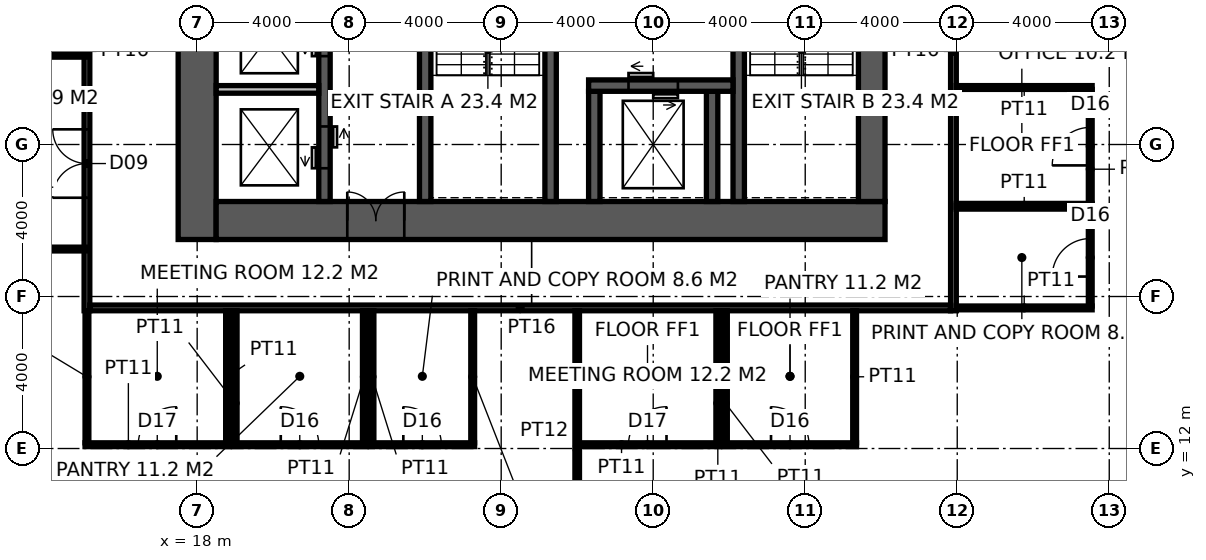
"""IFC4 building model, lengths in metres.
Left out: names, types, materials, properties, quantities, classifications, styles, units other than length and angle.
Written with IfcOpenShell. Run it as: python <this file> out.ifc"""

import sys

from ifc_helpers import new_model, si_unit, direction, frame, frame_2d, origin, place, context, subcontext, project, spatial, rectangle, extrude, element, fill, save


model = new_model("IFC4")
c1 = context("Model", 3, precision=1e-05, world=origin(), true_north=direction((0.0, 1.0)))
c2 = subcontext(c1, "Body", "Model", "MODEL_VIEW")
j1 = project(units=[si_unit("LENGTHUNIT", "METRE"), si_unit("PLANEANGLEUNIT", "RADIAN")], contexts=[c1])
p1 = place(None, origin())
s1 = spatial("IfcSite", under=j1, at=p1, CompositionType="ELEMENT")
p2 = place(p1, origin())
s2 = spatial("IfcBuilding", under=s1, at=p2, CompositionType="ELEMENT")
p3 = place(p2, frame((0.0, 0.0, 175.8)))
s3 = spatial("IfcBuildingStorey", under=s2, at=p3, CompositionType="ELEMENT", Elevation=175.8)
p4 = place(p3, frame((18.0, 17.5, -0.15), z_axis=(0.0, 0.0, 1.0), x_axis=(0.0, 1.0, 0.0)))
e1 = element("IfcWall", 1, at=p4, inside=s3, PredefinedType="SHEAR", context=c2, shape_type="SweptSolid", body=[
    extrude(rectangle(XDim=19.0, YDim=1.0, at=frame_2d((9.5, 0.0))), origin(), (0.0, 0.0, 1.0), 4.0),
])
p5 = place(p3, frame((18.5, 18.0, -0.15), z_axis=(0.0, 0.0, 1.0), x_axis=(1.0, 0.0, 0.0)))
e2 = element("IfcWall", 2, at=p5, inside=s3, PredefinedType="SHEAR", context=c2, shape_type="SweptSolid", body=[
    extrude(rectangle(XDim=17.6, YDim=1.0, at=frame_2d((8.8, 0.0))), origin(), (0.0, 0.0, 1.0), 4.0),
])
p6 = place(p5, frame((3.45, 0.0, 0.15)))
e3 = element("IfcOpeningElement", 3, at=p6, cuts=e2, PredefinedType="OPENING", context=c2, shape_type="SweptSolid", body=[
    extrude(rectangle(XDim=1.5, YDim=2.4, at=frame_2d((0.75, 1.2))), frame((0.0, 0.51, 0.0), z_axis=(0.0, -1.0, 0.0), x_axis=(1.0, 0.0, 0.0)), (0.0, 0.0, 1.0), 1.02),
])
p7 = place(p3, frame((35.75, 18.5, -0.15), z_axis=(0.0, 0.0, 1.0), x_axis=(0.0, 1.0, 0.0)))
e4 = element("IfcWall", 4, at=p7, inside=s3, PredefinedType="SHEAR", context=c2, shape_type="SweptSolid", body=[
    extrude(rectangle(XDim=17.0, YDim=0.7, at=frame_2d((8.5, 0.0))), origin(), (0.0, 0.0, 1.0), 4.0),
])
p8 = place(p7, frame((9.85, 0.0, 0.15)))
e5 = element("IfcOpeningElement", 5, at=p8, cuts=e4, PredefinedType="OPENING", context=c2, shape_type="SweptSolid", body=[
    extrude(rectangle(XDim=1.0, YDim=2.2, at=frame_2d((0.5, 1.1))), frame((0.0, 0.36, 0.0), z_axis=(0.0, -1.0, 0.0), x_axis=(1.0, 0.0, 0.0)), (0.0, 0.0, 1.0), 0.72),
])
p9 = place(p3, frame((24.0, 18.5, -0.15), z_axis=(0.0, 0.0, 1.0), x_axis=(0.0, 1.0, 0.0)))
e6 = element("IfcWall", 6, at=p9, inside=s3, PredefinedType="SHEAR", context=c2, shape_type="SweptSolid", body=[
    extrude(rectangle(XDim=17.0, YDim=0.3, at=frame_2d((8.5, 0.0))), origin(), (0.0, 0.0, 1.0), 4.0),
])
p10 = place(p9, frame((9.6, 0.0, 0.15)))
e7 = element("IfcOpeningElement", 7, at=p10, cuts=e6, PredefinedType="OPENING", context=c2, shape_type="SweptSolid", body=[
    extrude(rectangle(XDim=1.5, YDim=2.4, at=frame_2d((0.75, 1.2))), frame((0.0, 0.16, 0.0), z_axis=(0.0, -1.0, 0.0), x_axis=(1.0, 0.0, 0.0)), (0.0, 0.0, 1.0), 0.32),
])
p11 = place(p3, frame((27.3, 18.5, -0.15), z_axis=(0.0, 0.0, 1.0), x_axis=(0.0, 1.0, 0.0)))
e8 = element("IfcWall", 8, at=p11, inside=s3, PredefinedType="SHEAR", context=c2, shape_type="SweptSolid", body=[
    extrude(rectangle(XDim=7.9, YDim=0.3, at=frame_2d((3.95, 0.0))), origin(), (0.0, 0.0, 1.0), 4.0),
])
p12 = place(p11, frame((6.4, 0.0, 0.15)))
e9 = element("IfcOpeningElement", 9, at=p12, cuts=e8, PredefinedType="OPENING", context=c2, shape_type="SweptSolid", body=[
    extrude(rectangle(XDim=1.0, YDim=2.2, at=frame_2d((0.5, 1.1))), frame((0.0, 0.16, 0.0), z_axis=(0.0, -1.0, 0.0), x_axis=(1.0, 0.0, 0.0)), (0.0, 0.0, 1.0), 0.32),
])
p13 = place(p3, frame((32.25, 18.5, -0.15), z_axis=(0.0, 0.0, 1.0), x_axis=(0.0, 1.0, 0.0)))
e10 = element("IfcWall", 10, at=p13, inside=s3, PredefinedType="SHEAR", context=c2, shape_type="SweptSolid", body=[
    extrude(rectangle(XDim=7.9, YDim=0.3, at=frame_2d((3.95, 0.0))), origin(), (0.0, 0.0, 1.0), 4.0),
])
for number, where, z_axis, x_axis in (
    (11, (28.45, 18.5, -0.15), (0.0, 0.0, 1.0), (0.0, 1.0, 0.0)),
    (12, (31.55, 18.5, -0.15), (0.0, 0.0, 1.0), (0.0, 1.0, 0.0)),
):
    element("IfcWall", number, at=place(p3, frame(where, z_axis=z_axis, x_axis=x_axis)), inside=s3, PredefinedType="SHEAR", context=c2, shape_type="SweptSolid", body=[
        extrude(rectangle(XDim=2.9, YDim=0.3, at=frame_2d((1.45, 0.0))), origin(), (0.0, 0.0, 1.0), 4.0),
    ])
p14 = place(p3, frame((28.3, 21.55, -0.15), z_axis=(0.0, 0.0, 1.0), x_axis=(1.0, 0.0, 0.0)))
e13 = element("IfcWall", 13, at=p14, inside=s3, PredefinedType="SHEAR", context=c2, shape_type="SweptSolid", body=[
    extrude(rectangle(XDim=3.8, YDim=0.3, at=frame_2d((1.9, 0.0))), origin(), (0.0, 0.0, 1.0), 4.0),
])
p15 = place(p14, frame((1.05, 0.0, 0.15)))
e14 = element("IfcOpeningElement", 14, at=p15, cuts=e13, PredefinedType="OPENING", context=c2, shape_type="SweptSolid", body=[
    extrude(rectangle(XDim=1.3, YDim=2.4, at=frame_2d((0.65, 1.2))), frame((0.0, 0.16, 0.0), z_axis=(0.0, -1.0, 0.0), x_axis=(1.0, 0.0, 0.0)), (0.0, 0.0, 1.0), 0.32),
])
p16 = place(p3, frame((21.35, 18.5, -0.15), z_axis=(0.0, 0.0, 1.0), x_axis=(0.0, 1.0, 0.0)))
e15 = element("IfcWall", 15, at=p16, inside=s3, PredefinedType="SHEAR", context=c2, shape_type="SweptSolid", body=[
    extrude(rectangle(XDim=12.5, YDim=0.3, at=frame_2d((6.25, 0.0))), origin(), (0.0, 0.0, 1.0), 4.0),
])
p17 = place(p16, frame((0.875, 0.0, 0.15)))
e16 = element("IfcOpeningElement", 16, at=p17, cuts=e15, PredefinedType="OPENING", context=c2, shape_type="SweptSolid", body=[
    extrude(rectangle(XDim=1.1, YDim=2.2, at=frame_2d((0.55, 1.1))), frame((0.0, 0.16, 0.0), z_axis=(0.0, -1.0, 0.0), x_axis=(1.0, 0.0, 0.0)), (0.0, 0.0, 1.0), 0.32),
])
p18 = place(p16, frame((3.825, 0.0, 0.15)))
e17 = element("IfcOpeningElement", 17, at=p18, cuts=e15, PredefinedType="OPENING", context=c2, shape_type="SweptSolid", body=[
    extrude(rectangle(XDim=1.1, YDim=2.2, at=frame_2d((0.55, 1.1))), frame((0.0, 0.16, 0.0), z_axis=(0.0, -1.0, 0.0), x_axis=(1.0, 0.0, 0.0)), (0.0, 0.0, 1.0), 0.32),
])
p19 = place(p16, frame((6.675, 0.0, 0.15)))
e18 = element("IfcOpeningElement", 18, at=p19, cuts=e15, PredefinedType="OPENING", context=c2, shape_type="SweptSolid", body=[
    extrude(rectangle(XDim=1.1, YDim=2.2, at=frame_2d((0.55, 1.1))), frame((0.0, 0.16, 0.0), z_axis=(0.0, -1.0, 0.0), x_axis=(1.0, 0.0, 0.0)), (0.0, 0.0, 1.0), 0.32),
])
p20 = place(p16, frame((9.575, 0.0, 0.15)))
e19 = element("IfcOpeningElement", 19, at=p20, cuts=e15, PredefinedType="OPENING", context=c2, shape_type="SweptSolid", body=[
    extrude(rectangle(XDim=1.1, YDim=2.2, at=frame_2d((0.55, 1.1))), frame((0.0, 0.16, 0.0), z_axis=(0.0, -1.0, 0.0), x_axis=(1.0, 0.0, 0.0)), (0.0, 0.0, 1.0), 0.32),
])
p21 = place(p3, frame((18.5, 21.45, -0.15), z_axis=(0.0, 0.0, 1.0), x_axis=(1.0, 0.0, 0.0)))
e20 = element("IfcWall", 20, at=p21, inside=s3, PredefinedType="SOLIDWALL", context=c2, shape_type="SweptSolid", body=[
    extrude(rectangle(XDim=2.7, YDim=0.2, at=frame_2d((1.35, 0.0))), origin(), (0.0, 0.0, 1.0), 4.0),
])
p22 = place(p3, frame((15.1, 15.625, 0.0), z_axis=(0.0, 0.0, 1.0), x_axis=(0.0, 1.0, 0.0)))
e21 = element("IfcWall", 21, at=p22, inside=s3, PredefinedType="PARTITIONING", context=c2, shape_type="SweptSolid", body=[
    extrude(rectangle(XDim=22.75, YDim=0.15, at=frame_2d((11.375, 0.0))), origin(), (0.0, 0.0, 1.0), 3.85),
])
p23 = place(p22, frame((2.974, 0.0, 0.0)))
e22 = element("IfcOpeningElement", 22, at=p23, cuts=e21, PredefinedType="OPENING", context=c2, shape_type="SweptSolid", body=[
    extrude(rectangle(XDim=1.8, YDim=2.4, at=frame_2d((0.9, 1.2))), frame((0.0, 0.085, 0.0), z_axis=(0.0, -1.0, 0.0), x_axis=(1.0, 0.0, 0.0)), (0.0, 0.0, 1.0), 0.17),
])
p24 = place(p22, frame((14.225, 0.0, 0.0)))
e23 = element("IfcOpeningElement", 23, at=p24, cuts=e21, PredefinedType="OPENING", context=c2, shape_type="SweptSolid", body=[
    extrude(rectangle(XDim=1.8, YDim=2.4, at=frame_2d((0.9, 1.2))), frame((0.0, 0.085, 0.0), z_axis=(0.0, -1.0, 0.0), x_axis=(1.0, 0.0, 0.0)), (0.0, 0.0, 1.0), 0.17),
])
p25 = place(p3, frame((37.9, 15.625, 0.0), z_axis=(0.0, 0.0, 1.0), x_axis=(0.0, 1.0, 0.0)))
e24 = element("IfcWall", 24, at=p25, inside=s3, PredefinedType="PARTITIONING", context=c2, shape_type="SweptSolid", body=[
    extrude(rectangle(XDim=22.75, YDim=0.15, at=frame_2d((11.375, 0.0))), origin(), (0.0, 0.0, 1.0), 2.95),
])
p26 = place(p25, frame((10.475, 0.0, 0.0)))
e25 = element("IfcOpeningElement", 25, at=p26, cuts=e24, PredefinedType="OPENING", context=c2, shape_type="SweptSolid", body=[
    extrude(rectangle(XDim=1.8, YDim=2.4, at=frame_2d((0.9, 1.2))), frame((0.0, 0.085, 0.0), z_axis=(0.0, -1.0, 0.0), x_axis=(1.0, 0.0, 0.0)), (0.0, 0.0, 1.0), 0.17),
])
p27 = place(p3, frame((15.175, 15.7, 0.0), z_axis=(0.0, 0.0, 1.0), x_axis=(1.0, 0.0, 0.0)))
e26 = element("IfcWall", 26, at=p27, inside=s3, PredefinedType="PARTITIONING", context=c2, shape_type="SweptSolid", body=[
    extrude(rectangle(XDim=22.65, YDim=0.15, at=frame_2d((11.325, 0.0))), origin(), (0.0, 0.0, 1.0), 3.85),
])
p28 = place(p3, frame((28.0, 8.3, 0.0), z_axis=(0.0, 0.0, 1.0), x_axis=(0.0, 1.0, 0.0)))
e27 = element("IfcWall", 27, at=p28, inside=s3, PredefinedType="PARTITIONING", context=c2, shape_type="SweptSolid", body=[
    extrude(rectangle(XDim=7.325, YDim=0.12, at=frame_2d((3.663, 0.0))), origin(), (0.0, 0.0, 1.0), 3.85),
])
p29 = place(p3, frame((15.05, 12.1, 0.0), z_axis=(0.0, 0.0, 1.0), x_axis=(1.0, 0.0, 0.0)))
e28 = element("IfcWall", 28, at=p29, inside=s3, PredefinedType="PARTITIONING", context=c2, shape_type="SweptSolid", body=[
    extrude(rectangle(XDim=3.8, YDim=0.1, at=frame_2d((1.9, 0.0))), origin(), (0.0, 0.0, 1.0), 3.85),
])
p30 = place(p29, frame((1.4, 0.0, 0.0)))
e29 = element("IfcOpeningElement", 29, at=p30, cuts=e28, PredefinedType="OPENING", context=c2, shape_type="SweptSolid", body=[
    extrude(rectangle(XDim=1.0, YDim=2.2, at=frame_2d((0.5, 1.1))), frame((0.0, 0.06, 0.0), z_axis=(0.0, -1.0, 0.0), x_axis=(1.0, 0.0, 0.0)), (0.0, 0.0, 1.0), 0.12),
])
p31 = place(p3, frame((18.95, 12.1, 0.0), z_axis=(0.0, 0.0, 1.0), x_axis=(1.0, 0.0, 0.0)))
e30 = element("IfcWall", 30, at=p31, inside=s3, PredefinedType="PARTITIONING", context=c2, shape_type="SweptSolid", body=[
    extrude(rectangle(XDim=3.5, YDim=0.1, at=frame_2d((1.75, 0.0))), origin(), (0.0, 0.0, 1.0), 3.85),
])
p32 = place(p31, frame((1.25, 0.0, 0.0)))
e31 = element("IfcOpeningElement", 31, at=p32, cuts=e30, PredefinedType="OPENING", context=c2, shape_type="SweptSolid", body=[
    extrude(rectangle(XDim=1.0, YDim=2.2, at=frame_2d((0.5, 1.1))), frame((0.0, 0.06, 0.0), z_axis=(0.0, -1.0, 0.0), x_axis=(1.0, 0.0, 0.0)), (0.0, 0.0, 1.0), 0.12),
])
p33 = place(p3, frame((22.55, 12.1, 0.0), z_axis=(0.0, 0.0, 1.0), x_axis=(1.0, 0.0, 0.0)))
e32 = element("IfcWall", 32, at=p33, inside=s3, PredefinedType="PARTITIONING", context=c2, shape_type="SweptSolid", body=[
    extrude(rectangle(XDim=2.75, YDim=0.1, at=frame_2d((1.375, 0.0))), origin(), (0.0, 0.0, 1.0), 3.85),
])
p34 = place(p33, frame((0.875, 0.0, 0.0)))
e33 = element("IfcOpeningElement", 33, at=p34, cuts=e32, PredefinedType="OPENING", context=c2, shape_type="SweptSolid", body=[
    extrude(rectangle(XDim=1.0, YDim=2.2, at=frame_2d((0.5, 1.1))), frame((0.0, 0.06, 0.0), z_axis=(0.0, -1.0, 0.0), x_axis=(1.0, 0.0, 0.0)), (0.0, 0.0, 1.0), 0.12),
])
p35 = place(p3, frame((28.06, 12.1, 0.0), z_axis=(0.0, 0.0, 1.0), x_axis=(1.0, 0.0, 0.0)))
e34 = element("IfcWall", 34, at=p35, inside=s3, PredefinedType="PARTITIONING", context=c2, shape_type="SweptSolid", body=[
    extrude(rectangle(XDim=3.69, YDim=0.1, at=frame_2d((1.845, 0.0))), origin(), (0.0, 0.0, 1.0), 3.85),
])
p36 = place(p35, frame((1.29, 0.0, 0.0)))
e35 = element("IfcOpeningElement", 35, at=p36, cuts=e34, PredefinedType="OPENING", context=c2, shape_type="SweptSolid", body=[
    extrude(rectangle(XDim=1.0, YDim=2.2, at=frame_2d((0.5, 1.1))), frame((0.0, 0.06, 0.0), z_axis=(0.0, -1.0, 0.0), x_axis=(1.0, 0.0, 0.0)), (0.0, 0.0, 1.0), 0.12),
])
p37 = place(p3, frame((31.85, 12.1, 0.0), z_axis=(0.0, 0.0, 1.0), x_axis=(1.0, 0.0, 0.0)))
e36 = element("IfcWall", 36, at=p37, inside=s3, PredefinedType="PARTITIONING", context=c2, shape_type="SweptSolid", body=[
    extrude(rectangle(XDim=3.5, YDim=0.1, at=frame_2d((1.75, 0.0))), origin(), (0.0, 0.0, 1.0), 3.85),
])
p38 = place(p37, frame((1.25, 0.0, 0.0)))
e37 = element("IfcOpeningElement", 37, at=p38, cuts=e36, PredefinedType="OPENING", context=c2, shape_type="SweptSolid", body=[
    extrude(rectangle(XDim=1.0, YDim=2.2, at=frame_2d((0.5, 1.1))), frame((0.0, 0.06, 0.0), z_axis=(0.0, -1.0, 0.0), x_axis=(1.0, 0.0, 0.0)), (0.0, 0.0, 1.0), 0.12),
])
for number, where, z_axis, x_axis in (
    (38, (37.975, 15.7, 0.0), (0.0, 0.0, 1.0), (1.0, 0.0, 0.0)),
    (39, (37.975, 18.35, 0.0), (0.0, 0.0, 1.0), (1.0, 0.0, 0.0)),
    (40, (37.975, 18.4, 0.0), (0.0, 0.0, 1.0), (1.0, 0.0, 0.0)),
    (41, (37.975, 21.5, 0.0), (0.0, 0.0, 1.0), (1.0, 0.0, 0.0)),
):
    element("IfcWall", number, at=place(p3, frame(where, z_axis=z_axis, x_axis=x_axis)), inside=s3, PredefinedType="PARTITIONING", context=c2, shape_type="SweptSolid", body=[
        extrude(rectangle(XDim=3.575, YDim=0.1, at=frame_2d((1.788, 0.0))), origin(), (0.0, 0.0, 1.0), 3.85),
    ])
for number, where, z_axis, x_axis in (
    (42, (15.1, 12.15, 0.0), (0.0, 0.0, 1.0), (0.0, 1.0, 0.0)),
    (43, (18.8, 12.15, 0.0), (0.0, 0.0, 1.0), (0.0, 1.0, 0.0)),
    (44, (19.0, 12.15, 0.0), (0.0, 0.0, 1.0), (0.0, 1.0, 0.0)),
    (45, (22.4, 12.15, 0.0), (0.0, 0.0, 1.0), (0.0, 1.0, 0.0)),
    (46, (22.6, 12.15, 0.0), (0.0, 0.0, 1.0), (0.0, 1.0, 0.0)),
    (47, (25.25, 12.15, 0.0), (0.0, 0.0, 1.0), (0.0, 1.0, 0.0)),
    (48, (31.7, 12.15, 0.0), (0.0, 0.0, 1.0), (0.0, 1.0, 0.0)),
    (49, (31.9, 12.15, 0.0), (0.0, 0.0, 1.0), (0.0, 1.0, 0.0)),
    (50, (35.3, 12.15, 0.0), (0.0, 0.0, 1.0), (0.0, 1.0, 0.0)),
):
    element("IfcWall", number, at=place(p3, frame(where, z_axis=z_axis, x_axis=x_axis)), inside=s3, PredefinedType="PARTITIONING", context=c2, shape_type="SweptSolid", body=[
        extrude(rectangle(XDim=3.475, YDim=0.1, at=frame_2d((1.738, 0.0))), origin(), (0.0, 0.0, 1.0), 3.85),
    ])
p39 = place(p3, frame((41.5, 15.75, 0.0), z_axis=(0.0, 0.0, 1.0), x_axis=(0.0, 1.0, 0.0)))
e51 = element("IfcWall", 51, at=p39, inside=s3, PredefinedType="PARTITIONING", context=c2, shape_type="SweptSolid", body=[
    extrude(rectangle(XDim=2.55, YDim=0.1, at=frame_2d((1.275, 0.0))), origin(), (0.0, 0.0, 1.0), 3.85),
])
p40 = place(p39, frame((0.775, 0.0, 0.0)))
e52 = element("IfcOpeningElement", 52, at=p40, cuts=e51, PredefinedType="OPENING", context=c2, shape_type="SweptSolid", body=[
    extrude(rectangle(XDim=1.0, YDim=2.2, at=frame_2d((0.5, 1.1))), frame((0.0, 0.06, 0.0), z_axis=(0.0, -1.0, 0.0), x_axis=(1.0, 0.0, 0.0)), (0.0, 0.0, 1.0), 0.12),
])
p41 = place(p3, frame((41.5, 18.45, 0.0), z_axis=(0.0, 0.0, 1.0), x_axis=(0.0, 1.0, 0.0)))
e53 = element("IfcWall", 53, at=p41, inside=s3, PredefinedType="PARTITIONING", context=c2, shape_type="SweptSolid", body=[
    extrude(rectangle(XDim=3.0, YDim=0.1, at=frame_2d((1.5, 0.0))), origin(), (0.0, 0.0, 1.0), 3.85),
])
p42 = place(p41, frame((1.0, 0.0, 0.0)))
e54 = element("IfcOpeningElement", 54, at=p42, cuts=e53, PredefinedType="OPENING", context=c2, shape_type="SweptSolid", body=[
    extrude(rectangle(XDim=1.0, YDim=2.2, at=frame_2d((0.5, 1.1))), frame((0.0, 0.06, 0.0), z_axis=(0.0, -1.0, 0.0), x_axis=(1.0, 0.0, 0.0)), (0.0, 0.0, 1.0), 0.12),
])
for number, where, z_axis, x_axis in (
    (55, (15.1, 22.349, 0.0), (0.0, 0.0, 1.0), (-1.0, 0.0, 0.0)),
    (56, (10.6, 17.249, 0.0), (0.0, 0.0, 1.0), (1.0, 0.0, 0.0)),
):
    element("IfcWall", number, at=place(p3, frame(where, z_axis=z_axis, x_axis=x_axis)), inside=s3, PredefinedType="PARTITIONING", context=c2, shape_type="SweptSolid", body=[
        extrude(rectangle(XDim=4.5, YDim=0.1, at=frame_2d((2.25, 0.0))), origin(), (0.0, 0.0, 1.0), 3.85),
    ])
p43 = place(p6, origin())
e57 = element("IfcDoor", 57, at=p43, inside=s3, OperationType="DOUBLE_DOOR_DOUBLE_SWING", PredefinedType="DOOR", context=c2, shape_type="SweptSolid", body=[
    extrude(rectangle(XDim=1.5, YDim=2.4, at=frame_2d((0.75, 1.2))), frame((0.0, 0.025, 0.0), z_axis=(0.0, -1.0, 0.0), x_axis=(1.0, 0.0, 0.0)), (0.0, 0.0, 1.0), 0.05),
])
fill(e3, e57)
p44 = place(p23, origin())
e58 = element("IfcDoor", 58, at=p44, inside=s3, OperationType="DOUBLE_DOOR_DOUBLE_SWING", PredefinedType="DOOR", context=c2, shape_type="SweptSolid", body=[
    extrude(rectangle(XDim=1.8, YDim=2.4, at=frame_2d((0.9, 1.2))), frame((0.0, 0.025, 0.0), z_axis=(0.0, -1.0, 0.0), x_axis=(1.0, 0.0, 0.0)), (0.0, 0.0, 1.0), 0.05),
])
fill(e22, e58)
p45 = place(p30, origin())
e59 = element("IfcDoor", 59, at=p45, inside=s3, OperationType="SINGLE_SWING_RIGHT", PredefinedType="DOOR", context=c2, shape_type="SweptSolid", body=[
    extrude(rectangle(XDim=1.0, YDim=2.2, at=frame_2d((0.5, 1.1))), frame((0.0, 0.025, 0.0), z_axis=(0.0, -1.0, 0.0), x_axis=(1.0, 0.0, 0.0)), (0.0, 0.0, 1.0), 0.05),
])
fill(e29, e59)
p46 = place(p32, origin())
e60 = element("IfcDoor", 60, at=p46, inside=s3, OperationType="SINGLE_SWING_LEFT", PredefinedType="DOOR", context=c2, shape_type="SweptSolid", body=[
    extrude(rectangle(XDim=1.0, YDim=2.2, at=frame_2d((0.5, 1.1))), frame((0.0, 0.025, 0.0), z_axis=(0.0, -1.0, 0.0), x_axis=(1.0, 0.0, 0.0)), (0.0, 0.0, 1.0), 0.05),
])
fill(e31, e60)
p47 = place(p34, origin())
e61 = element("IfcDoor", 61, at=p47, inside=s3, OperationType="SINGLE_SWING_LEFT", PredefinedType="DOOR", context=c2, shape_type="SweptSolid", body=[
    extrude(rectangle(XDim=1.0, YDim=2.2, at=frame_2d((0.5, 1.1))), frame((0.0, 0.025, 0.0), z_axis=(0.0, -1.0, 0.0), x_axis=(1.0, 0.0, 0.0)), (0.0, 0.0, 1.0), 0.05),
])
fill(e33, e61)
p48 = place(p36, origin())
e62 = element("IfcDoor", 62, at=p48, inside=s3, OperationType="SINGLE_SWING_RIGHT", PredefinedType="DOOR", context=c2, shape_type="SweptSolid", body=[
    extrude(rectangle(XDim=1.0, YDim=2.2, at=frame_2d((0.5, 1.1))), frame((0.0, 0.025, 0.0), z_axis=(0.0, -1.0, 0.0), x_axis=(1.0, 0.0, 0.0)), (0.0, 0.0, 1.0), 0.05),
])
fill(e35, e62)
p49 = place(p38, origin())
e63 = element("IfcDoor", 63, at=p49, inside=s3, OperationType="SINGLE_SWING_LEFT", PredefinedType="DOOR", context=c2, shape_type="SweptSolid", body=[
    extrude(rectangle(XDim=1.0, YDim=2.2, at=frame_2d((0.5, 1.1))), frame((0.0, 0.025, 0.0), z_axis=(0.0, -1.0, 0.0), x_axis=(1.0, 0.0, 0.0)), (0.0, 0.0, 1.0), 0.05),
])
fill(e37, e63)
p50 = place(p40, origin())
e64 = element("IfcDoor", 64, at=p50, inside=s3, OperationType="SINGLE_SWING_LEFT", PredefinedType="DOOR", context=c2, shape_type="SweptSolid", body=[
    extrude(rectangle(XDim=1.0, YDim=2.2, at=frame_2d((0.5, 1.1))), frame((0.0, 0.025, 0.0), z_axis=(0.0, -1.0, 0.0), x_axis=(1.0, 0.0, 0.0)), (0.0, 0.0, 1.0), 0.05),
])
fill(e52, e64)
p51 = place(p42, origin())
e65 = element("IfcDoor", 65, at=p51, inside=s3, OperationType="SINGLE_SWING_LEFT", PredefinedType="DOOR", context=c2, shape_type="SweptSolid", body=[
    extrude(rectangle(XDim=1.0, YDim=2.2, at=frame_2d((0.5, 1.1))), frame((0.0, 0.025, 0.0), z_axis=(0.0, -1.0, 0.0), x_axis=(1.0, 0.0, 0.0)), (0.0, 0.0, 1.0), 0.05),
])
fill(e54, e65)
p52 = place(p15, origin())
e66 = element("IfcDoor", 66, at=p52, inside=s3, OperationType="DOUBLE_DOOR_SLIDING", PredefinedType="DOOR", context=c2, shape_type="SweptSolid", body=[
    extrude(rectangle(XDim=1.3, YDim=2.4, at=frame_2d((0.65, 1.2))), frame((0.0, 0.025, 0.0), z_axis=(0.0, -1.0, 0.0), x_axis=(1.0, 0.0, 0.0)), (0.0, 0.0, 1.0), 0.05),
])
fill(e14, e66)
p53 = place(p17, origin())
e67 = element("IfcDoor", 67, at=p53, inside=s3, OperationType="DOUBLE_DOOR_SLIDING", PredefinedType="DOOR", context=c2, shape_type="SweptSolid", body=[
    extrude(rectangle(XDim=1.1, YDim=2.2, at=frame_2d((0.55, 1.1))), frame((0.0, 0.025, 0.0), z_axis=(0.0, -1.0, 0.0), x_axis=(1.0, 0.0, 0.0)), (0.0, 0.0, 1.0), 0.05),
])
fill(e16, e67)
p54 = place(p18, origin())
e68 = element("IfcDoor", 68, at=p54, inside=s3, OperationType="DOUBLE_DOOR_SLIDING", PredefinedType="DOOR", context=c2, shape_type="SweptSolid", body=[
    extrude(rectangle(XDim=1.1, YDim=2.2, at=frame_2d((0.55, 1.1))), frame((0.0, 0.025, 0.0), z_axis=(0.0, -1.0, 0.0), x_axis=(1.0, 0.0, 0.0)), (0.0, 0.0, 1.0), 0.05),
])
fill(e17, e68)
save(model, sys.argv[1])
